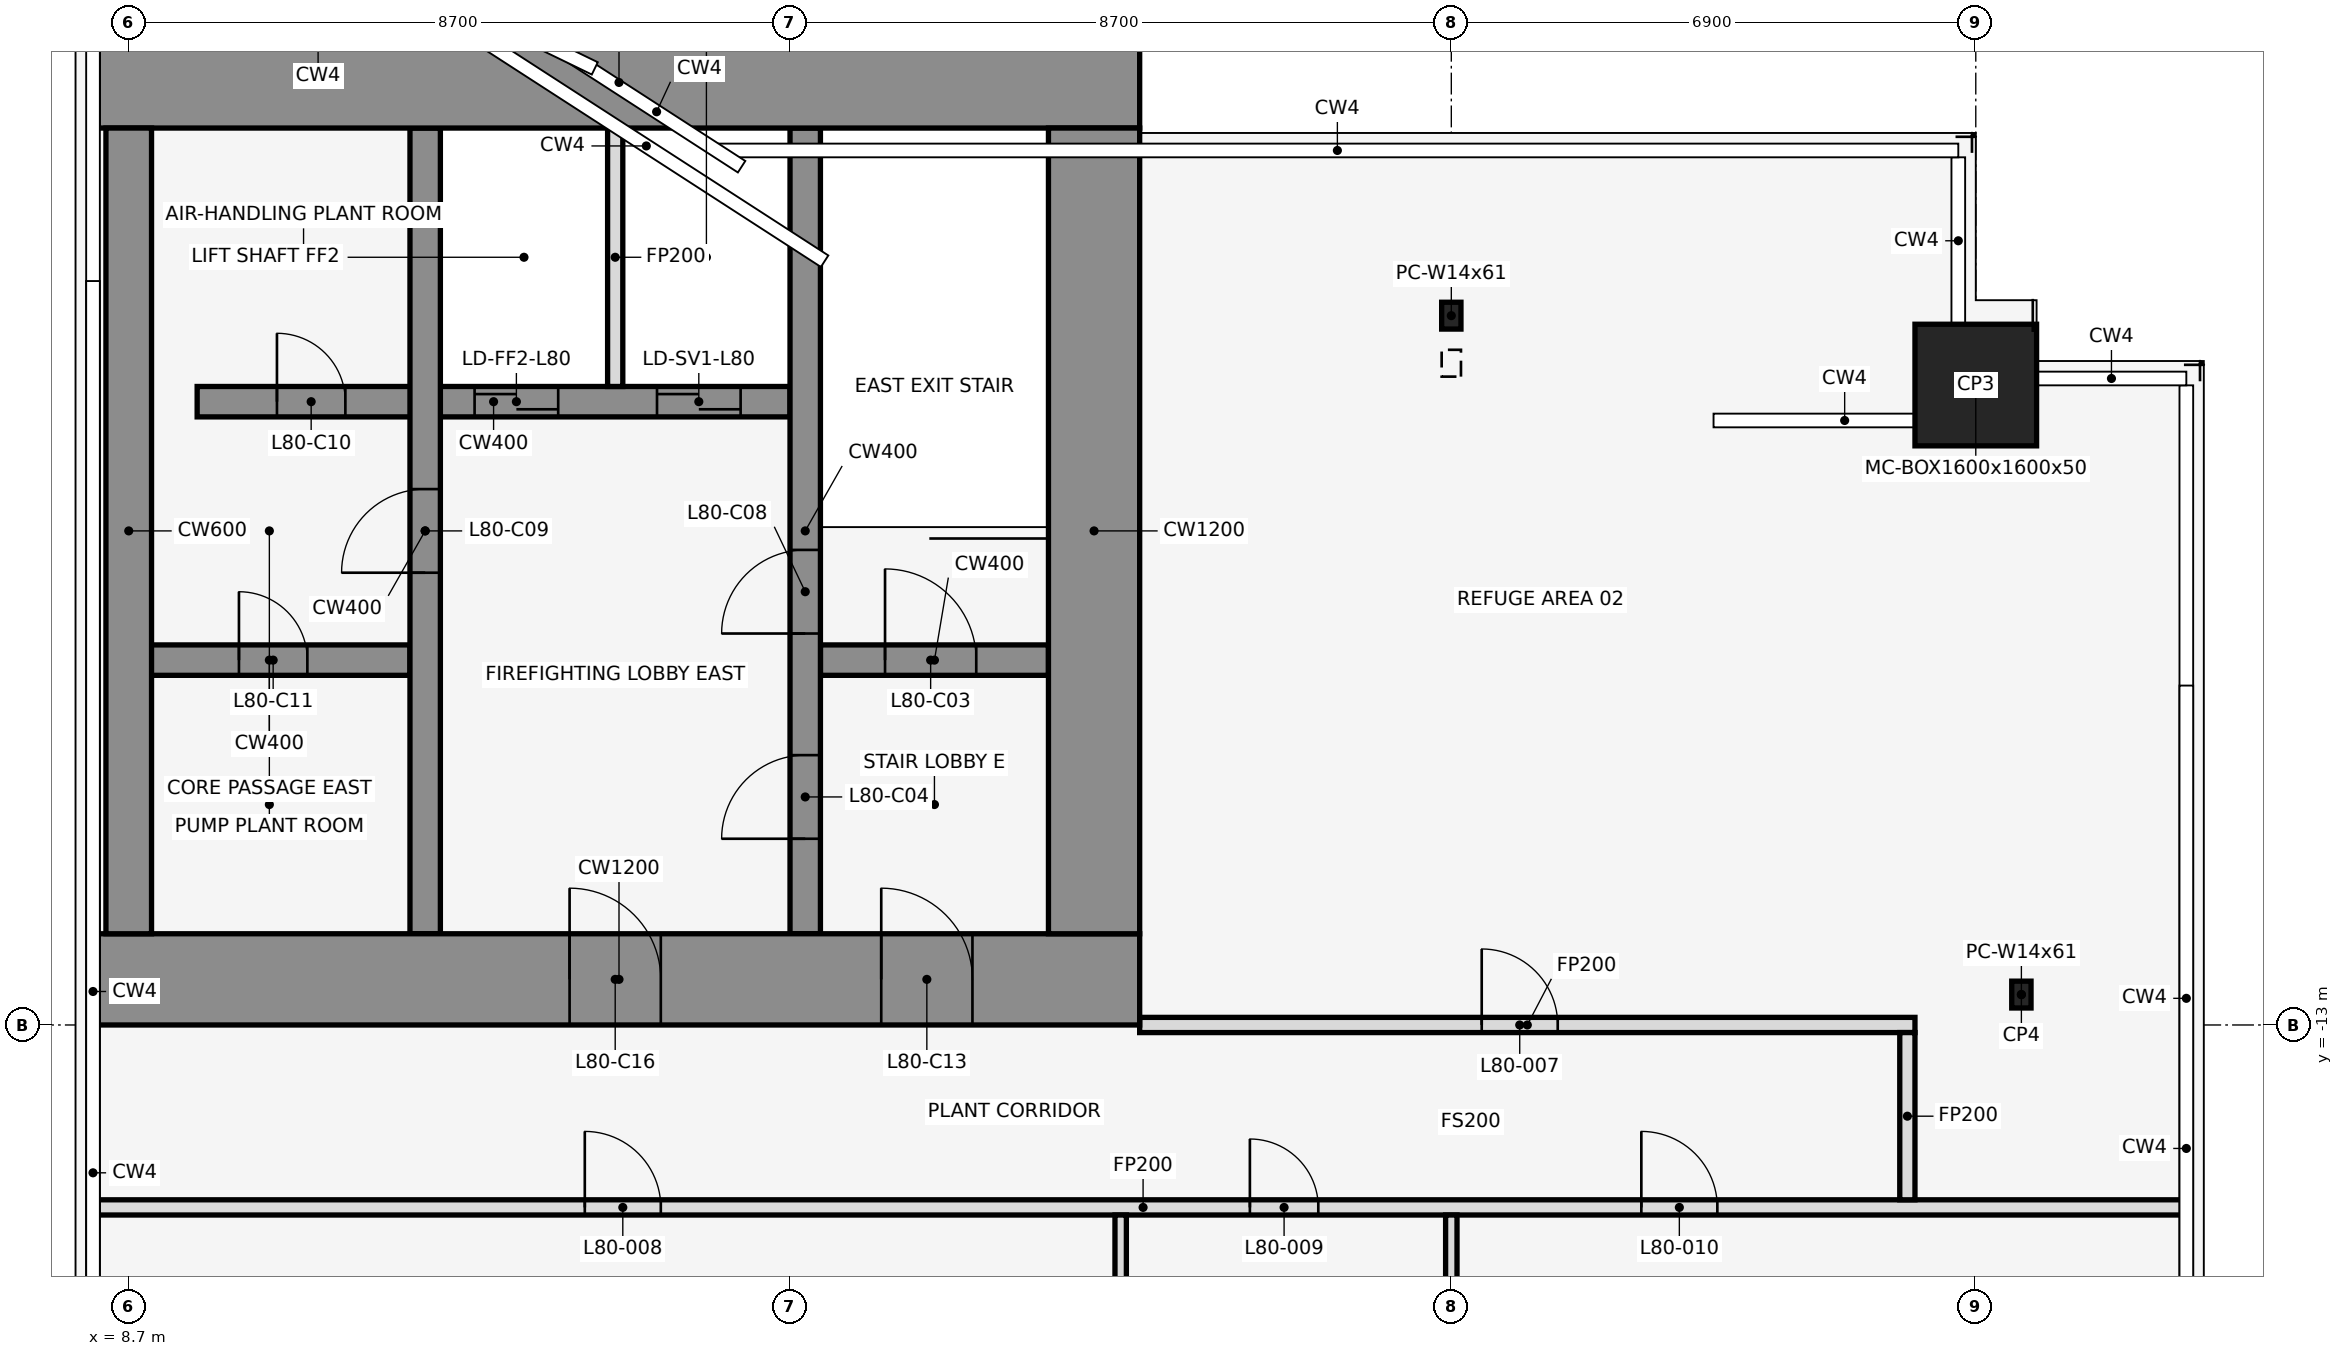
"""IFC4 building model, lengths in metres.
Left out: names, types, materials, properties, quantities, classifications, styles, units other than length and angle.
Written with IfcOpenShell. Run it as: python <this file> out.ifc"""

import sys

from ifc_helpers import new_model, si_unit, direction, frame, frame_2d, origin, origin_2d, place, context, subcontext, project, spatial, rectangle, hollow_rectangle, i_section, extrude, element, fill, save


model = new_model("IFC4")
c1 = context("Model", 3, precision=1e-05, world=origin(), true_north=direction((0.0, 1.0)))
c2 = subcontext(c1, "Body", "Model", "MODEL_VIEW")
j1 = project(units=[si_unit("LENGTHUNIT", "METRE"), si_unit("PLANEANGLEUNIT", "RADIAN")], contexts=[c1])
p1 = place(None, origin())
s1 = spatial("IfcSite", under=j1, at=p1, CompositionType="ELEMENT")
p2 = place(p1, origin())
s2 = spatial("IfcBuilding", under=s1, at=p2, CompositionType="ELEMENT")
p3 = place(p2, frame((0.0, 0.0, 356.9)))
s3 = spatial("IfcBuildingStorey", under=s2, at=p3, CompositionType="ELEMENT", Elevation=356.9)
p4 = place(p3, frame((26.1, -3.668, 0.024), z_axis=(0.0, -0.139200740592, 0.990264183851), x_axis=(1.0, 0.0, 0.0)))
e1 = element("IfcColumn", 1, at=p4, inside=s3, PredefinedType="COLUMN", context=c2, shape_type="SweptSolid", body=[
    extrude(i_section(OverallWidth=0.254, OverallDepth=0.353, WebThickness=0.01, FlangeThickness=0.016, at=origin_2d()), origin(), (0.0, 0.0, 1.0), 4.495),
])
p5 = place(p3, frame((33.0, -4.581, 0.0), z_axis=(0.0, 0.0, 1.0), x_axis=(1.0, 0.0, 0.0)))
e2 = element("IfcColumn", 2, at=p5, inside=s3, PredefinedType="COLUMN", context=c2, shape_type="SweptSolid", body=[
    extrude(hollow_rectangle(XDim=1.6, YDim=1.6, WallThickness=0.05, at=origin_2d()), origin(), (0.0, 0.0, 1.0), 4.5),
])
p6 = place(p3, frame((33.6, -12.6, 0.0), z_axis=(0.0, 0.0, 1.0), x_axis=(1.0, 0.0, 0.0)))
e3 = element("IfcColumn", 3, at=p6, inside=s3, PredefinedType="COLUMN", context=c2, shape_type="SweptSolid", body=[
    extrude(i_section(OverallWidth=0.254, OverallDepth=0.353, WebThickness=0.01, FlangeThickness=0.016, at=origin_2d()), origin(), (0.0, 0.0, 1.0), 4.5),
])
p7 = place(p3, frame((8.3, -15.4, 0.0), z_axis=(0.0, 0.0, 1.0), x_axis=(1.0, 0.0, 0.0)))
e4 = element("IfcWall", 4, at=p7, inside=s3, PredefinedType="PARTITIONING", context=c2, shape_type="SweptSolid", body=[
    extrude(rectangle(XDim=27.49, YDim=0.2, at=frame_2d((13.745, 0.0))), origin(), (0.0, 0.0, 1.0), 3.368),
])
p8 = place(p7, frame((6.4, 0.0, 0.0)))
e5 = element("IfcOpeningElement", 5, at=p8, cuts=e4, PredefinedType="OPENING", context=c2, shape_type="SweptSolid", body=[
    extrude(rectangle(XDim=1.0, YDim=2.1, at=frame_2d((0.5, 1.05))), frame((0.0, 0.112, 0.0), z_axis=(0.0, -1.0, 0.0), x_axis=(1.0, 0.0, 0.0)), (0.0, 0.0, 1.0), 0.224),
])
p9 = place(p7, frame((15.15, 0.0, 0.0)))
e6 = element("IfcOpeningElement", 6, at=p9, cuts=e4, PredefinedType="OPENING", context=c2, shape_type="SweptSolid", body=[
    extrude(rectangle(XDim=0.9, YDim=2.1, at=frame_2d((0.45, 1.05))), frame((0.0, 0.112, 0.0), z_axis=(0.0, -1.0, 0.0), x_axis=(1.0, 0.0, 0.0)), (0.0, 0.0, 1.0), 0.224),
])
p10 = place(p7, frame((20.3, 0.0, 0.0)))
e7 = element("IfcOpeningElement", 7, at=p10, cuts=e4, PredefinedType="OPENING", context=c2, shape_type="SweptSolid", body=[
    extrude(rectangle(XDim=1.0, YDim=2.1, at=frame_2d((0.5, 1.05))), frame((0.0, 0.112, 0.0), z_axis=(0.0, -1.0, 0.0), x_axis=(1.0, 0.0, 0.0)), (0.0, 0.0, 1.0), 0.224),
])
p11 = place(p3, frame((22.0, -13.0, 0.0), z_axis=(0.0, 0.0, 1.0), x_axis=(1.0, 0.0, 0.0)))
e8 = element("IfcWall", 8, at=p11, inside=s3, PredefinedType="PARTITIONING", context=c2, shape_type="SweptSolid", body=[
    extrude(rectangle(XDim=10.2, YDim=0.2, at=frame_2d((5.1, 0.0))), origin(), (0.0, 0.0, 1.0), 3.368),
])
p12 = place(p11, frame((4.5, 0.0, 0.0)))
e9 = element("IfcOpeningElement", 9, at=p12, cuts=e8, PredefinedType="OPENING", context=c2, shape_type="SweptSolid", body=[
    extrude(rectangle(XDim=1.0, YDim=2.1, at=frame_2d((0.5, 1.05))), frame((0.0, 0.112, 0.0), z_axis=(0.0, -1.0, 0.0), x_axis=(1.0, 0.0, 0.0)), (0.0, 0.0, 1.0), 0.224),
])
for number, where, z_axis, x_axis in (
    (10, (21.75, -23.73, 0.0), (0.0, 0.0, 1.0), (0.0, 1.0, 0.0)),
    (11, (26.1, -23.73, 0.0), (0.0, 0.0, 1.0), (0.0, 1.0, 0.0)),
):
    element("IfcWall", number, at=place(p3, frame(where, z_axis=z_axis, x_axis=x_axis)), inside=s3, PredefinedType="PARTITIONING", context=c2, shape_type="SweptSolid", body=[
        extrude(rectangle(XDim=8.23, YDim=0.15, at=frame_2d((4.115, 0.0))), origin(), (0.0, 0.0, 1.0), 3.368),
    ])
p13 = place(p3, frame((32.1, -15.3, 0.0), z_axis=(0.0, 0.0, 1.0), x_axis=(0.0, 1.0, 0.0)))
e12 = element("IfcWall", 12, at=p13, inside=s3, PredefinedType="PARTITIONING", context=c2, shape_type="SweptSolid", body=[
    extrude(rectangle(XDim=2.2, YDim=0.2, at=frame_2d((1.1, 0.0))), origin(), (0.0, 0.0, 1.0), 3.368),
])
p14 = place(p3, frame((8.7, -8.2, 0.0), z_axis=(0.0, 0.0, 1.0), x_axis=(1.0, 0.0, 0.0)))
e13 = element("IfcWall", 13, at=p14, inside=s3, PredefinedType="SHEAR", context=c2, shape_type="SweptSolid", body=[
    extrude(rectangle(XDim=3.7, YDim=0.4, at=frame_2d((1.85, 0.0))), origin(), (0.0, 0.0, 1.0), 4.5),
])
p15 = place(p14, frame((1.45, 0.0, 0.0)))
e14 = element("IfcOpeningElement", 14, at=p15, cuts=e13, PredefinedType="OPENING", context=c2, shape_type="SweptSolid", body=[
    extrude(rectangle(XDim=0.9, YDim=2.1, at=frame_2d((0.45, 1.05))), frame((0.0, 0.212, 0.0), z_axis=(0.0, -1.0, 0.0), x_axis=(1.0, 0.0, 0.0)), (0.0, 0.0, 1.0), 0.424),
])
p16 = place(p3, frame((17.8, -8.2, 0.0), z_axis=(0.0, 0.0, 1.0), x_axis=(1.0, 0.0, 0.0)))
e15 = element("IfcWall", 15, at=p16, inside=s3, PredefinedType="SHEAR", context=c2, shape_type="SweptSolid", body=[
    extrude(rectangle(XDim=3.0, YDim=0.4, at=frame_2d((1.5, 0.0))), origin(), (0.0, 0.0, 1.0), 4.5),
])
p17 = place(p16, frame((0.85, 0.0, 0.0)))
e16 = element("IfcOpeningElement", 16, at=p17, cuts=e15, PredefinedType="OPENING", context=c2, shape_type="SweptSolid", body=[
    extrude(rectangle(XDim=1.2, YDim=2.1, at=frame_2d((0.6, 1.05))), frame((0.0, 0.212, 0.0), z_axis=(0.0, -1.0, 0.0), x_axis=(1.0, 0.0, 0.0)), (0.0, 0.0, 1.0), 0.424),
])
p18 = place(p3, frame((9.6, -4.8, 0.0), z_axis=(0.0, 0.0, 1.0), x_axis=(1.0, 0.0, 0.0)))
e17 = element("IfcWall", 17, at=p18, inside=s3, PredefinedType="SHEAR", context=c2, shape_type="SweptSolid", body=[
    extrude(rectangle(XDim=7.8, YDim=0.4, at=frame_2d((3.9, 0.0))), origin(), (0.0, 0.0, 1.0), 4.5),
])
p19 = place(p18, frame((3.65, 0.0, 0.0)))
e18 = element("IfcOpeningElement", 18, at=p19, cuts=e17, PredefinedType="OPENING", context=c2, shape_type="SweptSolid", body=[
    extrude(rectangle(XDim=1.1, YDim=2.1, at=frame_2d((0.55, 1.05))), frame((0.0, 0.212, 0.0), z_axis=(0.0, -1.0, 0.0), x_axis=(1.0, 0.0, 0.0)), (0.0, 0.0, 1.0), 0.424),
])
p20 = place(p18, frame((6.05, 0.0, 0.0)))
e19 = element("IfcOpeningElement", 19, at=p20, cuts=e17, PredefinedType="OPENING", context=c2, shape_type="SweptSolid", body=[
    extrude(rectangle(XDim=1.1, YDim=2.1, at=frame_2d((0.55, 1.05))), frame((0.0, 0.212, 0.0), z_axis=(0.0, -1.0, 0.0), x_axis=(1.0, 0.0, 0.0)), (0.0, 0.0, 1.0), 0.424),
])
p21 = place(p18, frame((1.05, 0.0, 0.0)))
e20 = element("IfcOpeningElement", 20, at=p21, cuts=e17, PredefinedType="OPENING", context=c2, shape_type="SweptSolid", body=[
    extrude(rectangle(XDim=0.9, YDim=2.1, at=frame_2d((0.45, 1.05))), frame((0.0, 0.212, 0.0), z_axis=(0.0, -1.0, 0.0), x_axis=(1.0, 0.0, 0.0)), (0.0, 0.0, 1.0), 0.424),
])
p22 = place(p3, frame((12.6, -11.8, 0.0), z_axis=(0.0, 0.0, 1.0), x_axis=(0.0, 1.0, 0.0)))
e21 = element("IfcWall", 21, at=p22, inside=s3, PredefinedType="SHEAR", context=c2, shape_type="SweptSolid", body=[
    extrude(rectangle(XDim=10.6, YDim=0.4, at=frame_2d((5.3, 0.0))), origin(), (0.0, 0.0, 1.0), 4.5),
])
p23 = place(p22, frame((4.75, 0.0, 0.0)))
e22 = element("IfcOpeningElement", 22, at=p23, cuts=e21, PredefinedType="OPENING", context=c2, shape_type="SweptSolid", body=[
    extrude(rectangle(XDim=1.1, YDim=2.1, at=frame_2d((0.55, 1.05))), frame((0.0, 0.212, 0.0), z_axis=(0.0, -1.0, 0.0), x_axis=(1.0, 0.0, 0.0)), (0.0, 0.0, 1.0), 0.424),
])
p24 = place(p3, frame((15.1, -4.6, 0.0), z_axis=(0.0, 0.0, 1.0), x_axis=(0.0, 1.0, 0.0)))
e23 = element("IfcWall", 23, at=p24, inside=s3, PredefinedType="PARTITIONING", context=c2, shape_type="SweptSolid", body=[
    extrude(rectangle(XDim=3.4, YDim=0.2, at=frame_2d((1.7, 0.0))), origin(), (0.0, 0.0, 1.0), 3.368),
])
p25 = place(p3, frame((17.6, -11.8, 0.0), z_axis=(0.0, 0.0, 1.0), x_axis=(0.0, 1.0, 0.0)))
e24 = element("IfcWall", 24, at=p25, inside=s3, PredefinedType="SHEAR", context=c2, shape_type="SweptSolid", body=[
    extrude(rectangle(XDim=10.6, YDim=0.4, at=frame_2d((5.3, 0.0))), origin(), (0.0, 0.0, 1.0), 4.5),
])
p26 = place(p25, frame((1.25, 0.0, 0.0)))
e25 = element("IfcOpeningElement", 25, at=p26, cuts=e24, PredefinedType="OPENING", context=c2, shape_type="SweptSolid", body=[
    extrude(rectangle(XDim=1.1, YDim=2.1, at=frame_2d((0.55, 1.05))), frame((0.0, 0.212, 0.0), z_axis=(0.0, -1.0, 0.0), x_axis=(1.0, 0.0, 0.0)), (0.0, 0.0, 1.0), 0.424),
])
p27 = place(p25, frame((3.95, 0.0, 0.0)))
e26 = element("IfcOpeningElement", 26, at=p27, cuts=e24, PredefinedType="OPENING", context=c2, shape_type="SweptSolid", body=[
    extrude(rectangle(XDim=1.1, YDim=2.1, at=frame_2d((0.55, 1.05))), frame((0.0, 0.212, 0.0), z_axis=(0.0, -1.0, 0.0), x_axis=(1.0, 0.0, 0.0)), (0.0, 0.0, 1.0), 0.424),
])
p28 = place(p3, frame((8.3, -0.6, 0.0), z_axis=(0.0, 0.0, 1.0), x_axis=(1.0, 0.0, 0.0)))
e27 = element("IfcWall", 27, at=p28, inside=s3, PredefinedType="SHEAR", context=c2, shape_type="SweptSolid", body=[
    extrude(rectangle(XDim=13.7, YDim=1.2, at=frame_2d((6.85, 0.0))), origin(), (0.0, 0.0, 1.0), 4.5),
])
p29 = place(p3, frame((8.3, -12.4, 0.0), z_axis=(0.0, 0.0, 1.0), x_axis=(1.0, 0.0, 0.0)))
e28 = element("IfcWall", 28, at=p29, inside=s3, PredefinedType="SHEAR", context=c2, shape_type="SweptSolid", body=[
    extrude(rectangle(XDim=13.7, YDim=1.2, at=frame_2d((6.85, 0.0))), origin(), (0.0, 0.0, 1.0), 4.5),
])
p30 = place(p29, frame((10.3, 0.0, 0.0)))
e29 = element("IfcOpeningElement", 29, at=p30, cuts=e28, PredefinedType="OPENING", context=c2, shape_type="SweptSolid", body=[
    extrude(rectangle(XDim=1.2, YDim=2.1, at=frame_2d((0.6, 1.05))), frame((0.0, 0.612, 0.0), z_axis=(0.0, -1.0, 0.0), x_axis=(1.0, 0.0, 0.0)), (0.0, 0.0, 1.0), 1.224),
])
p31 = place(p29, frame((6.2, 0.0, 0.0)))
e30 = element("IfcOpeningElement", 30, at=p31, cuts=e28, PredefinedType="OPENING", context=c2, shape_type="SweptSolid", body=[
    extrude(rectangle(XDim=1.2, YDim=2.1, at=frame_2d((0.6, 1.05))), frame((0.0, 0.612, 0.0), z_axis=(0.0, -1.0, 0.0), x_axis=(1.0, 0.0, 0.0)), (0.0, 0.0, 1.0), 1.224),
])
p32 = place(p3, frame((21.4, -11.8, 0.0), z_axis=(0.0, 0.0, 1.0), x_axis=(0.0, 1.0, 0.0)))
e31 = element("IfcWall", 31, at=p32, inside=s3, PredefinedType="SHEAR", context=c2, shape_type="SweptSolid", body=[
    extrude(rectangle(XDim=10.6, YDim=1.2, at=frame_2d((5.3, 0.0))), origin(), (0.0, 0.0, 1.0), 4.5),
])
p33 = place(p3, frame((8.7, -11.8, 0.0), z_axis=(0.0, 0.0, 1.0), x_axis=(0.0, 1.0, 0.0)))
e32 = element("IfcWall", 32, at=p33, inside=s3, PredefinedType="SHEAR", context=c2, shape_type="SweptSolid", body=[
    extrude(rectangle(XDim=10.6, YDim=0.6, at=frame_2d((5.3, 0.0))), origin(), (0.0, 0.0, 1.0), 4.5),
])
p34 = place(p12, origin())
e33 = element("IfcDoor", 33, at=p34, inside=s3, OperationType="SINGLE_SWING_LEFT", PredefinedType="DOOR", context=c2, shape_type="SweptSolid", body=[
    extrude(rectangle(XDim=1.0, YDim=2.1, at=frame_2d((0.5, 1.05))), frame((0.0, 0.025, 0.0), z_axis=(0.0, -1.0, 0.0), x_axis=(1.0, 0.0, 0.0)), (0.0, 0.0, 1.0), 0.05),
])
fill(e9, e33)
p35 = place(p8, frame((1.0, 0.0, 0.0), z_axis=(0.0, 0.0, 1.0), x_axis=(-1.0, 0.0, 0.0)))
e34 = element("IfcDoor", 34, at=p35, inside=s3, OperationType="SINGLE_SWING_RIGHT", PredefinedType="DOOR", context=c2, shape_type="SweptSolid", body=[
    extrude(rectangle(XDim=1.0, YDim=2.1, at=frame_2d((0.5, 1.05))), frame((0.0, 0.025, 0.0), z_axis=(0.0, -1.0, 0.0), x_axis=(1.0, 0.0, 0.0)), (0.0, 0.0, 1.0), 0.05),
])
fill(e5, e34)
p36 = place(p9, frame((0.9, 0.0, 0.0), z_axis=(0.0, 0.0, 1.0), x_axis=(-1.0, 0.0, 0.0)))
e35 = element("IfcDoor", 35, at=p36, inside=s3, OperationType="SINGLE_SWING_RIGHT", PredefinedType="DOOR", context=c2, shape_type="SweptSolid", body=[
    extrude(rectangle(XDim=0.9, YDim=2.1, at=frame_2d((0.45, 1.05))), frame((0.0, 0.025, 0.0), z_axis=(0.0, -1.0, 0.0), x_axis=(1.0, 0.0, 0.0)), (0.0, 0.0, 1.0), 0.05),
])
fill(e6, e35)
p37 = place(p10, frame((1.0, 0.0, 0.0), z_axis=(0.0, 0.0, 1.0), x_axis=(-1.0, 0.0, 0.0)))
e36 = element("IfcDoor", 36, at=p37, inside=s3, OperationType="SINGLE_SWING_LEFT", PredefinedType="DOOR", context=c2, shape_type="SweptSolid", body=[
    extrude(rectangle(XDim=1.0, YDim=2.1, at=frame_2d((0.5, 1.05))), frame((0.0, 0.025, 0.0), z_axis=(0.0, -1.0, 0.0), x_axis=(1.0, 0.0, 0.0)), (0.0, 0.0, 1.0), 0.05),
])
fill(e7, e36)
p38 = place(p17, origin())
e37 = element("IfcDoor", 37, at=p38, inside=s3, OperationType="SINGLE_SWING_LEFT", PredefinedType="DOOR", context=c2, shape_type="SweptSolid", body=[
    extrude(rectangle(XDim=1.2, YDim=2.1, at=frame_2d((0.6, 1.05))), frame((0.0, 0.025, 0.0), z_axis=(0.0, -1.0, 0.0), x_axis=(1.0, 0.0, 0.0)), (0.0, 0.0, 1.0), 0.05),
])
fill(e16, e37)
p39 = place(p26, origin())
e38 = element("IfcDoor", 38, at=p39, inside=s3, OperationType="SINGLE_SWING_RIGHT", PredefinedType="DOOR", context=c2, shape_type="SweptSolid", body=[
    extrude(rectangle(XDim=1.1, YDim=2.1, at=frame_2d((0.55, 1.05))), frame((0.0, 0.025, 0.0), z_axis=(0.0, -1.0, 0.0), x_axis=(1.0, 0.0, 0.0)), (0.0, 0.0, 1.0), 0.05),
])
fill(e25, e38)
p40 = place(p19, origin())
e39 = element("IfcDoor", 39, at=p40, inside=s3, OperationType="DOUBLE_DOOR_SLIDING", PredefinedType="DOOR", context=c2, shape_type="SweptSolid", body=[
    extrude(rectangle(XDim=1.1, YDim=2.1, at=frame_2d((0.55, 1.05))), frame((0.0, 0.025, 0.0), z_axis=(0.0, -1.0, 0.0), x_axis=(1.0, 0.0, 0.0)), (0.0, 0.0, 1.0), 0.05),
])
fill(e18, e39)
p41 = place(p20, origin())
e40 = element("IfcDoor", 40, at=p41, inside=s3, OperationType="DOUBLE_DOOR_SLIDING", PredefinedType="DOOR", context=c2, shape_type="SweptSolid", body=[
    extrude(rectangle(XDim=1.1, YDim=2.1, at=frame_2d((0.55, 1.05))), frame((0.0, 0.025, 0.0), z_axis=(0.0, -1.0, 0.0), x_axis=(1.0, 0.0, 0.0)), (0.0, 0.0, 1.0), 0.05),
])
fill(e19, e40)
p42 = place(p27, origin())
e41 = element("IfcDoor", 41, at=p42, inside=s3, OperationType="SINGLE_SWING_RIGHT", PredefinedType="DOOR", context=c2, shape_type="SweptSolid", body=[
    extrude(rectangle(XDim=1.1, YDim=2.1, at=frame_2d((0.55, 1.05))), frame((0.0, 0.025, 0.0), z_axis=(0.0, -1.0, 0.0), x_axis=(1.0, 0.0, 0.0)), (0.0, 0.0, 1.0), 0.05),
])
fill(e26, e41)
p43 = place(p23, frame((1.1, 0.0, 0.0), z_axis=(0.0, 0.0, 1.0), x_axis=(-1.0, 0.0, 0.0)))
e42 = element("IfcDoor", 42, at=p43, inside=s3, OperationType="SINGLE_SWING_RIGHT", PredefinedType="DOOR", context=c2, shape_type="SweptSolid", body=[
    extrude(rectangle(XDim=1.1, YDim=2.1, at=frame_2d((0.55, 1.05))), frame((0.0, 0.025, 0.0), z_axis=(0.0, -1.0, 0.0), x_axis=(1.0, 0.0, 0.0)), (0.0, 0.0, 1.0), 0.05),
])
fill(e22, e42)
p44 = place(p21, origin())
e43 = element("IfcDoor", 43, at=p44, inside=s3, OperationType="SINGLE_SWING_RIGHT", PredefinedType="DOOR", context=c2, shape_type="SweptSolid", body=[
    extrude(rectangle(XDim=0.9, YDim=2.1, at=frame_2d((0.45, 1.05))), frame((0.0, 0.025, 0.0), z_axis=(0.0, -1.0, 0.0), x_axis=(1.0, 0.0, 0.0)), (0.0, 0.0, 1.0), 0.05),
])
fill(e20, e43)
p45 = place(p15, frame((0.9, 0.0, 0.0), z_axis=(0.0, 0.0, 1.0), x_axis=(-1.0, 0.0, 0.0)))
e44 = element("IfcDoor", 44, at=p45, inside=s3, OperationType="SINGLE_SWING_RIGHT", PredefinedType="DOOR", context=c2, shape_type="SweptSolid", body=[
    extrude(rectangle(XDim=0.9, YDim=2.1, at=frame_2d((0.45, 1.05))), frame((0.0, 0.025, 0.0), z_axis=(0.0, -1.0, 0.0), x_axis=(1.0, 0.0, 0.0)), (0.0, 0.0, 1.0), 0.05),
])
fill(e14, e44)
p46 = place(p30, frame((1.2, 0.0, 0.0), z_axis=(0.0, 0.0, 1.0), x_axis=(-1.0, 0.0, 0.0)))
e45 = element("IfcDoor", 45, at=p46, inside=s3, OperationType="SINGLE_SWING_RIGHT", PredefinedType="DOOR", context=c2, shape_type="SweptSolid", body=[
    extrude(rectangle(XDim=1.2, YDim=2.1, at=frame_2d((0.6, 1.05))), frame((0.0, 0.025, 0.0), z_axis=(0.0, -1.0, 0.0), x_axis=(1.0, 0.0, 0.0)), (0.0, 0.0, 1.0), 0.05),
])
fill(e29, e45)
p47 = place(p31, frame((1.2, 0.0, 0.0), z_axis=(0.0, 0.0, 1.0), x_axis=(-1.0, 0.0, 0.0)))
e46 = element("IfcDoor", 46, at=p47, inside=s3, OperationType="SINGLE_SWING_RIGHT", PredefinedType="DOOR", context=c2, shape_type="SweptSolid", body=[
    extrude(rectangle(XDim=1.2, YDim=2.1, at=frame_2d((0.6, 1.05))), frame((0.0, 0.025, 0.0), z_axis=(0.0, -1.0, 0.0), x_axis=(1.0, 0.0, 0.0)), (0.0, 0.0, 1.0), 0.05),
])
fill(e30, e46)
save(model, sys.argv[1])
